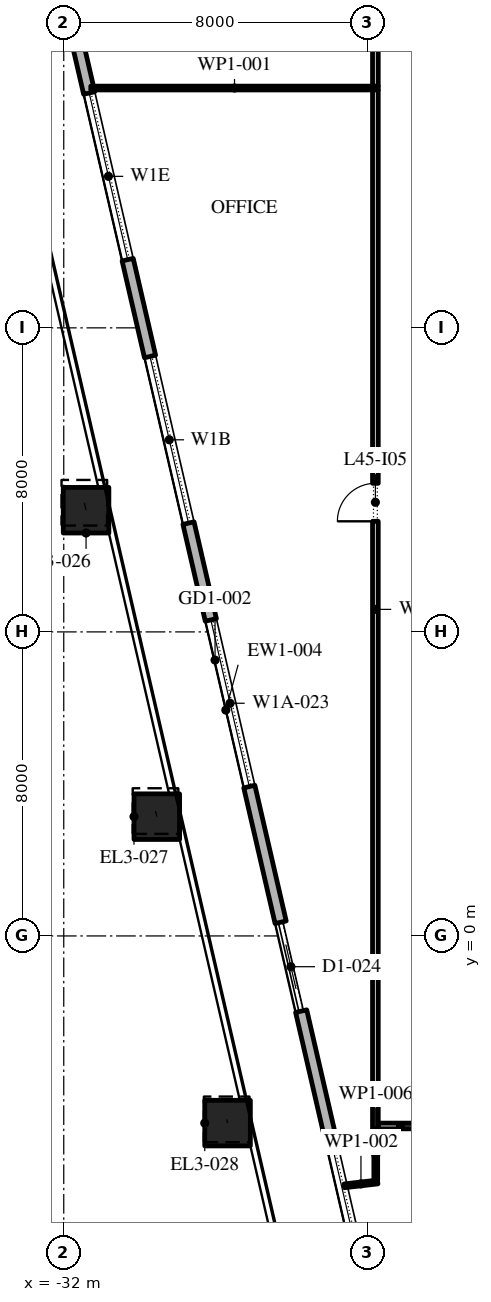
"""IFC4 building model, lengths in metres.
Left out: names, types, materials, properties, quantities, classifications, styles, units other than length and angle.
Written with IfcOpenShell. Run it as: python <this file> out.ifc"""

import sys

from ifc_helpers import new_model, si_unit, direction, frame, frame_2d, origin, origin_2d, place, context, subcontext, project, spatial, rectangle, extrude, element, fill, save


model = new_model("IFC4")
c1 = context("Model", 3, precision=1e-05, world=origin(), true_north=direction((0.0, 1.0)))
c2 = subcontext(c1, "Body", "Model", "MODEL_VIEW")
j1 = project(units=[si_unit("LENGTHUNIT", "METRE"), si_unit("PLANEANGLEUNIT", "RADIAN")], contexts=[c1])
p1 = place(None, origin())
s1 = spatial("IfcSite", under=j1, at=p1, CompositionType="ELEMENT")
p2 = place(p1, origin())
s2 = spatial("IfcBuilding", under=s1, at=p2, CompositionType="ELEMENT")
p3 = place(p2, frame((0.0, 0.0, 205.2)))
s3 = spatial("IfcBuildingStorey", under=s2, at=p3, CompositionType="ELEMENT", Elevation=205.2)
p4 = place(p3, frame((-31.413, 11.202, 0.0), z_axis=(-0.010799619665, 0.046740289408, 0.998848694028), x_axis=(-0.974329962248, -0.225124686929, 0.0)))
e1 = element("IfcColumn", 1, at=p4, inside=s3, PredefinedType="COLUMN", context=c2, shape_type="SweptSolid", body=[
    extrude(rectangle(XDim=1.2, YDim=1.2, at=origin_2d()), origin(), (0.0, 0.0, 1.0), 4.205),
])
p5 = place(p3, frame((-29.552, 3.139, 0.0), z_axis=(-0.008132851642, 0.035029353857, 0.999353191366), x_axis=(-0.974090845759, -0.226157078617, 0.0)))
e2 = element("IfcColumn", 2, at=p5, inside=s3, PredefinedType="COLUMN", context=c2, shape_type="SweptSolid", body=[
    extrude(rectangle(XDim=1.2, YDim=1.2, at=origin_2d()), origin(), (0.0, 0.0, 1.0), 4.203),
])
p6 = place(p3, frame((-27.69, -4.925, 0.0), z_axis=(-0.005404472139, 0.023419379268, 0.999711120452), x_axis=(-0.974391195695, -0.224859506699, 0.0)))
e3 = element("IfcColumn", 3, at=p6, inside=s3, PredefinedType="COLUMN", context=c2, shape_type="SweptSolid", body=[
    extrude(rectangle(XDim=1.2, YDim=1.2, at=origin_2d()), origin(), (0.0, 0.0, 1.0), 4.201),
])
p7 = place(p3, frame((-33.157, 30.092, 0.0), z_axis=(0.0, 0.0, 1.0), x_axis=(0.224950279389, -0.974370243697, 0.0)))
e4 = element("IfcWall", 4, at=p7, inside=s3, PredefinedType="STANDARD", context=c2, shape_type="SweptSolid", body=[
    extrude(rectangle(XDim=49.5, YDim=0.3, at=frame_2d((24.75, 0.0))), origin(), (0.0, 0.0, 1.0), 4.0),
])
p8 = place(p7, frame((2.207, 0.0, 0.0)))
e5 = element("IfcOpeningElement", 5, at=p8, cuts=e4, PredefinedType="OPENING", context=c2, shape_type="SweptSolid", body=[
    extrude(rectangle(XDim=2.4, YDim=3.5, at=frame_2d((1.2, 1.75))), frame((0.0, 0.16, 0.0), z_axis=(0.0, -1.0, 0.0), x_axis=(1.0, 0.0, 0.0)), (0.0, 0.0, 1.0), 0.32),
])
p9 = place(p7, frame((8.121, 0.0, 0.45)))
e6 = element("IfcOpeningElement", 6, at=p9, cuts=e4, PredefinedType="OPENING", context=c2, shape_type="SweptSolid", body=[
    extrude(rectangle(XDim=4.5, YDim=2.825, at=frame_2d((2.25, 1.413))), frame((0.0, 0.16, 0.0), z_axis=(0.0, -1.0, 0.0), x_axis=(1.0, 0.0, 0.0)), (0.0, 0.0, 1.0), 0.32),
])
p10 = place(p7, frame((15.236, 0.0, 0.45)))
e7 = element("IfcOpeningElement", 7, at=p10, cuts=e4, PredefinedType="OPENING", context=c2, shape_type="SweptSolid", body=[
    extrude(rectangle(XDim=4.5, YDim=2.95, at=frame_2d((2.25, 1.475))), frame((0.0, 0.16, 0.0), z_axis=(0.0, -1.0, 0.0), x_axis=(1.0, 0.0, 0.0)), (0.0, 0.0, 1.0), 0.32),
])
p11 = place(p7, frame((22.35, 0.0, 0.45)))
e8 = element("IfcOpeningElement", 8, at=p11, cuts=e4, PredefinedType="OPENING", context=c2, shape_type="SweptSolid", body=[
    extrude(rectangle(XDim=4.5, YDim=3.0, at=frame_2d((2.25, 1.5))), frame((0.0, 0.16, 0.0), z_axis=(0.0, -1.0, 0.0), x_axis=(1.0, 0.0, 0.0)), (0.0, 0.0, 1.0), 0.32),
])
p12 = place(p7, frame((30.514, 0.0, 0.0)))
e9 = element("IfcOpeningElement", 9, at=p12, cuts=e4, PredefinedType="OPENING", context=c2, shape_type="SweptSolid", body=[
    extrude(rectangle(XDim=2.4, YDim=3.5, at=frame_2d((1.2, 1.75))), frame((0.0, 0.16, 0.0), z_axis=(0.0, -1.0, 0.0), x_axis=(1.0, 0.0, 0.0)), (0.0, 0.0, 1.0), 0.32),
])
p13 = place(p7, frame((36.579, 0.0, 0.45)))
e10 = element("IfcOpeningElement", 10, at=p13, cuts=e4, PredefinedType="OPENING", context=c2, shape_type="SweptSolid", body=[
    extrude(rectangle(XDim=4.5, YDim=3.05, at=frame_2d((2.25, 1.525))), frame((0.0, 0.16, 0.0), z_axis=(0.0, -1.0, 0.0), x_axis=(1.0, 0.0, 0.0)), (0.0, 0.0, 1.0), 0.32),
])
p14 = place(p7, frame((43.693, 0.0, 0.45)))
e11 = element("IfcOpeningElement", 11, at=p14, cuts=e4, PredefinedType="OPENING", context=c2, shape_type="SweptSolid", body=[
    extrude(rectangle(XDim=4.5, YDim=3.05, at=frame_2d((2.25, 1.525))), frame((0.0, 0.16, 0.0), z_axis=(0.0, -1.0, 0.0), x_axis=(1.0, 0.0, 0.0)), (0.0, 0.0, 1.0), 0.32),
])
p15 = place(p3, frame((-31.289, 22.31, 0.0), z_axis=(0.0, 0.0, 1.0), x_axis=(1.0, 0.0, 0.0)))
e12 = element("IfcWall", 12, at=p15, inside=s3, PredefinedType="PARTITIONING", context=c2, shape_type="SweptSolid", body=[
    extrude(rectangle(XDim=7.564, YDim=0.1, at=frame_2d((3.782, 0.0))), origin(), (0.0, 0.0, 1.0), 4.0),
])
p16 = place(p3, frame((-24.62, -6.575, 0.0), z_axis=(0.0, 0.0, 1.0), x_axis=(0.993501545499, 0.113818623659, 0.0)))
e13 = element("IfcWall", 13, at=p16, inside=s3, PredefinedType="PARTITIONING", context=c2, shape_type="SweptSolid", body=[
    extrude(rectangle(XDim=0.886, YDim=0.1, at=frame_2d((0.443, 0.0))), origin(), (0.0, 0.0, 1.0), 4.0),
])
p17 = place(p3, frame((-23.8, -5.075, 0.0), z_axis=(0.0, 0.0, 1.0), x_axis=(0.0, 1.0, 0.0)))
e14 = element("IfcWall", 14, at=p17, inside=s3, PredefinedType="PARTITIONING", context=c2, shape_type="SweptSolid", body=[
    extrude(rectangle(XDim=27.335, YDim=0.15, at=frame_2d((13.667, 0.0))), origin(), (0.0, 0.0, 1.0), 4.0),
])
p18 = place(p17, frame((15.985, 0.0, 0.0)))
e15 = element("IfcOpeningElement", 15, at=p18, cuts=e14, PredefinedType="OPENING", context=c2, shape_type="SweptSolid", body=[
    extrude(rectangle(XDim=1.0, YDim=2.1, at=frame_2d((0.5, 1.05))), frame((0.0, 0.085, 0.0), z_axis=(0.0, -1.0, 0.0), x_axis=(1.0, 0.0, 0.0)), (0.0, 0.0, 1.0), 0.17),
])
p19 = place(p3, frame((-23.8, 22.36, 0.0), z_axis=(0.0, 0.0, 1.0), x_axis=(0.0, 1.0, 0.0)))
e16 = element("IfcWall", 16, at=p19, inside=s3, PredefinedType="PARTITIONING", context=c2, shape_type="SweptSolid", body=[
    extrude(rectangle(XDim=4.915, YDim=0.15, at=frame_2d((2.458, 0.0))), origin(), (0.0, 0.0, 1.0), 4.0),
])
p20 = place(p19, frame((2.94, 0.0, 0.0)))
e17 = element("IfcOpeningElement", 17, at=p20, cuts=e16, PredefinedType="OPENING", context=c2, shape_type="SweptSolid", body=[
    extrude(rectangle(XDim=1.0, YDim=2.1, at=frame_2d((0.5, 1.05))), frame((0.0, 0.085, 0.0), z_axis=(0.0, -1.0, 0.0), x_axis=(1.0, 0.0, 0.0)), (0.0, 0.0, 1.0), 0.17),
])
p21 = place(p3, frame((-23.79, -5.075, 0.0), z_axis=(0.0, 0.0, 1.0), x_axis=(0.0, -1.0, 0.0)))
e18 = element("IfcWall", 18, at=p21, inside=s3, PredefinedType="PARTITIONING", context=c2, shape_type="SweptSolid", body=[
    extrude(rectangle(XDim=1.355, YDim=0.1, at=frame_2d((0.677, 0.0))), origin(), (0.0, 0.0, 1.0), 4.0),
])
p22 = place(p3, frame((-22.57, -5.0, 0.0), z_axis=(0.0, 0.0, 1.0), x_axis=(-1.0, 0.0, 0.0)))
e19 = element("IfcWall", 19, at=p22, inside=s3, PredefinedType="PARTITIONING", context=c2, shape_type="SweptSolid", body=[
    extrude(rectangle(XDim=1.145, YDim=0.15, at=frame_2d((0.573, 0.0))), origin(), (0.0, 0.0, 1.0), 4.0),
])
p23 = place(p9, origin())
e20 = element("IfcWindow", 20, at=p23, inside=s3, PartitioningType="DOUBLE_PANEL_VERTICAL", PredefinedType="WINDOW", context=c2, shape_type="SweptSolid", body=[
    extrude(rectangle(XDim=4.5, YDim=2.825, at=frame_2d((2.25, 1.413))), frame((0.0, 0.03, 0.0), z_axis=(0.0, -1.0, 0.0), x_axis=(1.0, 0.0, 0.0)), (0.0, 0.0, 1.0), 0.06),
])
fill(e6, e20)
p24 = place(p10, origin())
e21 = element("IfcWindow", 21, at=p24, inside=s3, PartitioningType="DOUBLE_PANEL_VERTICAL", PredefinedType="WINDOW", context=c2, shape_type="SweptSolid", body=[
    extrude(rectangle(XDim=4.5, YDim=2.95, at=frame_2d((2.25, 1.475))), frame((0.0, 0.03, 0.0), z_axis=(0.0, -1.0, 0.0), x_axis=(1.0, 0.0, 0.0)), (0.0, 0.0, 1.0), 0.06),
])
fill(e7, e21)
p25 = place(p11, origin())
e22 = element("IfcWindow", 22, at=p25, inside=s3, PartitioningType="DOUBLE_PANEL_VERTICAL", PredefinedType="WINDOW", context=c2, shape_type="SweptSolid", body=[
    extrude(rectangle(XDim=4.5, YDim=3.0, at=frame_2d((2.25, 1.5))), frame((0.0, 0.03, 0.0), z_axis=(0.0, -1.0, 0.0), x_axis=(1.0, 0.0, 0.0)), (0.0, 0.0, 1.0), 0.06),
])
fill(e8, e22)
p26 = place(p12, origin())
e23 = element("IfcDoor", 23, at=p26, inside=s3, OperationType="DOUBLE_DOOR_SLIDING", PredefinedType="DOOR", context=c2, shape_type="SweptSolid", body=[
    extrude(rectangle(XDim=2.4, YDim=3.5, at=frame_2d((1.2, 1.75))), frame((0.0, 0.025, 0.0), z_axis=(0.0, -1.0, 0.0), x_axis=(1.0, 0.0, 0.0)), (0.0, 0.0, 1.0), 0.05),
])
fill(e9, e23)
p27 = place(p13, origin())
e24 = element("IfcWindow", 24, at=p27, inside=s3, PartitioningType="DOUBLE_PANEL_VERTICAL", PredefinedType="WINDOW", context=c2, shape_type="SweptSolid", body=[
    extrude(rectangle(XDim=4.5, YDim=3.05, at=frame_2d((2.25, 1.525))), frame((0.0, 0.03, 0.0), z_axis=(0.0, -1.0, 0.0), x_axis=(1.0, 0.0, 0.0)), (0.0, 0.0, 1.0), 0.06),
])
fill(e10, e24)
p28 = place(p18, origin())
e25 = element("IfcDoor", 25, at=p28, inside=s3, OperationType="SINGLE_SWING_RIGHT", PredefinedType="DOOR", context=c2, shape_type="SweptSolid", body=[
    extrude(rectangle(XDim=1.0, YDim=2.1, at=frame_2d((0.5, 1.05))), frame((0.0, 0.025, 0.0), z_axis=(0.0, -1.0, 0.0), x_axis=(1.0, 0.0, 0.0)), (0.0, 0.0, 1.0), 0.05),
])
fill(e15, e25)
save(model, sys.argv[1])
